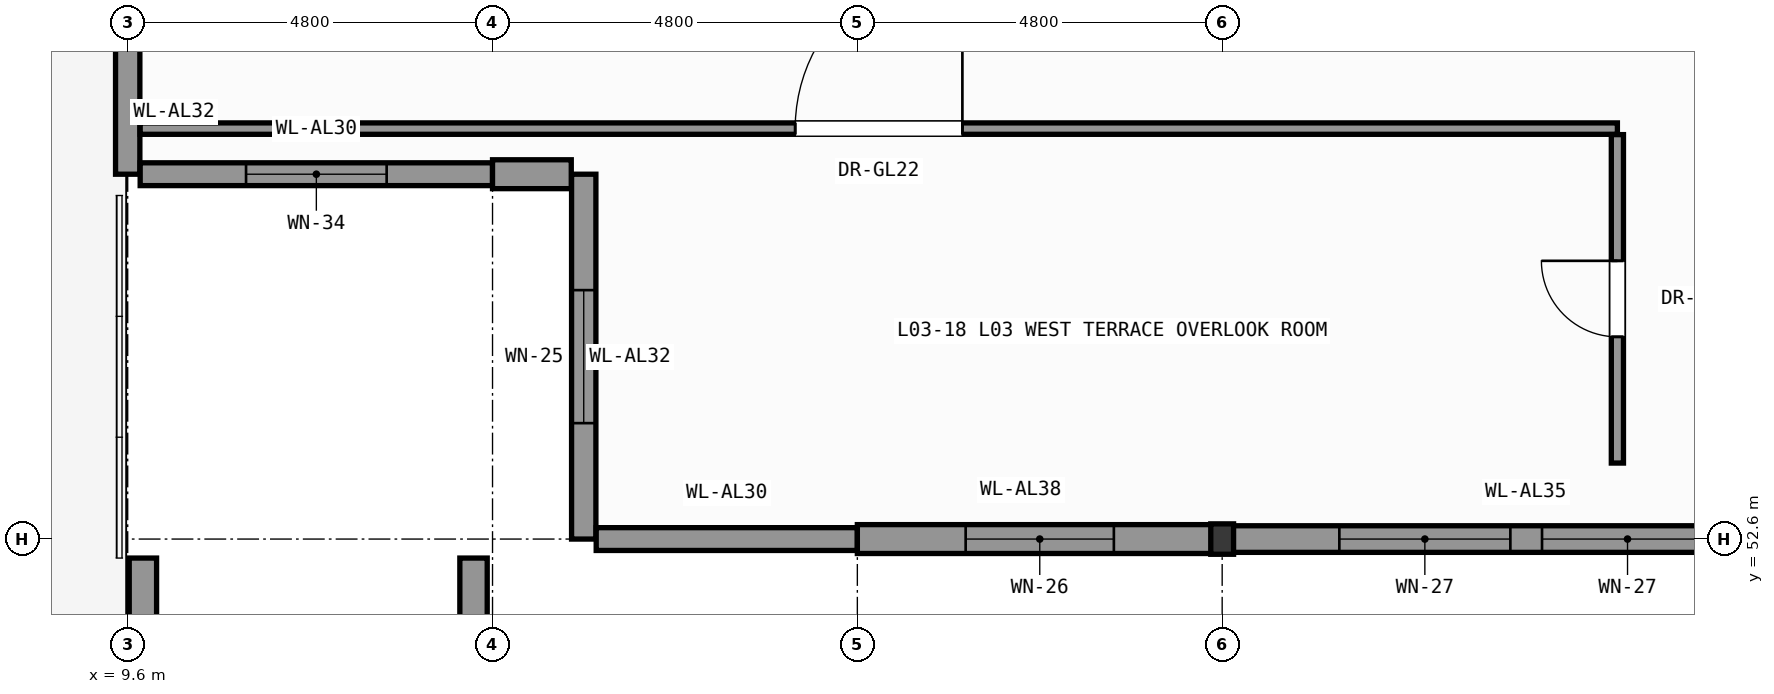
"""IFC4 building model, lengths in metres.
Left out: names, types, materials, properties, quantities, classifications, styles, units other than length and angle.
Written with IfcOpenShell. Run it as: python <this file> out.ifc"""

import sys

from ifc_helpers import new_model, si_unit, direction, frame, frame_2d, origin, origin_2d, place, context, subcontext, project, spatial, rectangle, i_section, extrude, element, fill, save


model = new_model("IFC4")
c1 = context("Model", 3, precision=1e-05, world=origin(), true_north=direction((0.0, 1.0)))
c2 = subcontext(c1, "Body", "Model", "MODEL_VIEW")
j1 = project(units=[si_unit("LENGTHUNIT", "METRE"), si_unit("PLANEANGLEUNIT", "RADIAN")], contexts=[c1])
p1 = place(None, origin())
s1 = spatial("IfcSite", under=j1, at=p1, CompositionType="ELEMENT")
p2 = place(p1, origin())
s2 = spatial("IfcBuilding", under=s1, at=p2, CompositionType="ELEMENT")
p3 = place(p2, frame((0.0, 0.0, 13.2)))
s3 = spatial("IfcBuildingStorey", under=s2, at=p3, CompositionType="ELEMENT", Elevation=13.2)
p4 = place(p3, frame((24.0, 52.6, 0.0), z_axis=(0.0, 0.0, 1.0), x_axis=(1.0, 0.0, 0.0)))
e1 = element("IfcColumn", 1, at=p4, inside=s3, PredefinedType="COLUMN", context=c2, shape_type="SweptSolid", body=[
    extrude(i_section(OverallWidth=0.3, OverallDepth=0.4, WebThickness=0.013, FlangeThickness=0.024, FilletRadius=0.027, at=origin_2d()), origin(), (0.0, 0.0, 1.0), 4.8),
])
p5 = place(p3, frame((15.6, 52.6, 0.0), z_axis=(0.0, 0.0, 1.0), x_axis=(0.0, 1.0, 0.0)))
e2 = element("IfcWall", 2, at=p5, inside=s3, PredefinedType="SOLIDWALL", context=c2, shape_type="SweptSolid", body=[
    extrude(rectangle(XDim=4.8, YDim=0.32, at=frame_2d((2.4, 0.0))), origin(), (0.0, 0.0, 1.0), 4.56),
])
p6 = place(p5, frame((1.525, 0.0, 0.95)))
e3 = element("IfcOpeningElement", 3, at=p6, cuts=e2, PredefinedType="OPENING", context=c2, shape_type="SweptSolid", body=[
    extrude(rectangle(XDim=1.75, YDim=2.35, at=frame_2d((0.875, 1.175))), frame((0.0, 0.17, 0.0), z_axis=(0.0, -1.0, 0.0), x_axis=(1.0, 0.0, 0.0)), (0.0, 0.0, 1.0), 0.34),
])
p7 = place(p3, frame((19.2, 52.6, 0.0), z_axis=(0.0, 0.0, 1.0), x_axis=(-1.0, 0.0, 0.0)))
e4 = element("IfcWall", 4, at=p7, inside=s3, PredefinedType="SOLIDWALL", context=c2, shape_type="SweptSolid", body=[
    extrude(rectangle(XDim=3.436, YDim=0.3, at=frame_2d((1.718, 0.0))), origin(), (0.0, 0.0, 1.0), 4.56),
])
p8 = place(p3, frame((24.0, 52.6, 0.0), z_axis=(0.0, 0.0, 1.0), x_axis=(-1.0, 0.0, 0.0)))
e5 = element("IfcWall", 5, at=p8, inside=s3, PredefinedType="SOLIDWALL", context=c2, shape_type="SweptSolid", body=[
    extrude(rectangle(XDim=4.8, YDim=0.38, at=frame_2d((2.4, 0.0))), origin(), (0.0, 0.0, 1.0), 4.56),
])
p9 = place(p8, frame((1.425, 0.0, 0.95)))
e6 = element("IfcOpeningElement", 6, at=p9, cuts=e5, PredefinedType="OPENING", context=c2, shape_type="SweptSolid", body=[
    extrude(rectangle(XDim=1.95, YDim=2.55, at=frame_2d((0.975, 1.275))), frame((0.0, 0.2, 0.0), z_axis=(0.0, -1.0, 0.0), x_axis=(1.0, 0.0, 0.0)), (0.0, 0.0, 1.0), 0.4),
])
p10 = place(p3, frame((32.0, 52.6, 0.0), z_axis=(0.0, 0.0, 1.0), x_axis=(-1.0, 0.0, 0.0)))
e7 = element("IfcWall", 7, at=p10, inside=s3, PredefinedType="SOLIDWALL", context=c2, shape_type="SweptSolid", body=[
    extrude(rectangle(XDim=8.0, YDim=0.35, at=frame_2d((4.0, 0.0))), origin(), (0.0, 0.0, 1.0), 4.315),
])
p11 = place(p10, frame((1.542, 0.0, 0.95)))
e8 = element("IfcOpeningElement", 8, at=p11, cuts=e7, PredefinedType="OPENING", context=c2, shape_type="SweptSolid", body=[
    extrude(rectangle(XDim=2.25, YDim=2.95, at=frame_2d((1.125, 1.475))), frame((0.0, 0.185, 0.0), z_axis=(0.0, -1.0, 0.0), x_axis=(1.0, 0.0, 0.0)), (0.0, 0.0, 1.0), 0.37),
])
p12 = place(p10, frame((4.208, 0.0, 0.95)))
e9 = element("IfcOpeningElement", 9, at=p12, cuts=e7, PredefinedType="OPENING", context=c2, shape_type="SweptSolid", body=[
    extrude(rectangle(XDim=2.25, YDim=2.95, at=frame_2d((1.125, 1.475))), frame((0.0, 0.185, 0.0), z_axis=(0.0, -1.0, 0.0), x_axis=(1.0, 0.0, 0.0)), (0.0, 0.0, 1.0), 0.37),
])
p13 = place(p3, frame((9.6, 57.4, 0.0), z_axis=(0.0, 0.0, 1.0), x_axis=(0.0, 1.0, 0.0)))
e10 = element("IfcWall", 10, at=p13, inside=s3, PredefinedType="SOLIDWALL", context=c2, shape_type="SweptSolid", body=[
    extrude(rectangle(XDim=2.2, YDim=0.32, at=frame_2d((1.1, 0.0))), origin(), (0.0, 0.0, 1.0), 4.56),
])
p14 = place(p3, frame((14.4, 57.4, 0.0), z_axis=(0.0, 0.0, 1.0), x_axis=(-1.0, 0.0, 0.0)))
e11 = element("IfcWall", 11, at=p14, inside=s3, PredefinedType="SOLIDWALL", context=c2, shape_type="SweptSolid", body=[
    extrude(rectangle(XDim=4.636, YDim=0.3, at=frame_2d((2.318, 0.0))), origin(), (0.0, 0.0, 1.0), 4.56),
])
p15 = place(p14, frame((1.393, 0.0, 0.95)))
e12 = element("IfcOpeningElement", 12, at=p15, cuts=e11, PredefinedType="OPENING", context=c2, shape_type="SweptSolid", body=[
    extrude(rectangle(XDim=1.85, YDim=3.15, at=frame_2d((0.925, 1.575))), frame((0.0, 0.16, 0.0), z_axis=(0.0, -1.0, 0.0), x_axis=(1.0, 0.0, 0.0)), (0.0, 0.0, 1.0), 0.32),
])
p16 = place(p3, frame((15.436, 57.4, 0.0), z_axis=(0.0, 0.0, 1.0), x_axis=(-1.0, 0.0, 0.0)))
e13 = element("IfcWall", 13, at=p16, inside=s3, PredefinedType="SOLIDWALL", context=c2, shape_type="SweptSolid", body=[
    extrude(rectangle(XDim=1.036, YDim=0.38, at=frame_2d((0.518, 0.0))), origin(), (0.0, 0.0, 1.0), 4.56),
])
for number, where, z_axis, x_axis in (
    (14, (9.8, 41.46, -13.2), (0.0, 0.0, 1.0), (0.0, 1.0, 0.0)),
    (15, (14.15, 41.46, -13.2), (0.0, 0.0, 1.0), (0.0, 1.0, 0.0)),
):
    element("IfcWall", number, at=place(p3, frame(where, z_axis=z_axis, x_axis=x_axis)), inside=s3, PredefinedType="SOLIDWALL", context=c2, shape_type="SweptSolid", body=[
        extrude(rectangle(XDim=10.89, YDim=0.36, at=frame_2d((5.445, 0.0))), origin(), (0.0, 0.0, 1.0), 17.78),
    ])
p17 = place(p3, frame((9.764, 58.0, 0.0), z_axis=(0.0, 0.0, 1.0), x_axis=(1.0, 0.0, 0.0)))
e16 = element("IfcWall", 16, at=p17, inside=s3, PredefinedType="PARTITIONING", context=c2, shape_type="SweptSolid", body=[
    extrude(rectangle(XDim=19.436, YDim=0.15, at=frame_2d((9.718, 0.0))), origin(), (0.0, 0.0, 1.0), 4.56),
])
p18 = place(p17, frame((8.618, 0.0, 0.0)))
e17 = element("IfcOpeningElement", 17, at=p18, cuts=e16, PredefinedType="OPENING", context=c2, shape_type="SweptSolid", body=[
    extrude(rectangle(XDim=2.2, YDim=2.6, at=frame_2d((1.1, 1.3))), frame((0.0, 0.085, 0.0), z_axis=(0.0, -1.0, 0.0), x_axis=(1.0, 0.0, 0.0)), (0.0, 0.0, 1.0), 0.17),
])
p19 = place(p3, frame((29.2, 53.6, 0.0), z_axis=(0.0, 0.0, 1.0), x_axis=(0.0, 1.0, 0.0)))
e18 = element("IfcWall", 18, at=p19, inside=s3, PredefinedType="PARTITIONING", context=c2, shape_type="SweptSolid", body=[
    extrude(rectangle(XDim=4.321, YDim=0.16, at=frame_2d((2.16, 0.0))), origin(), (0.0, 0.0, 1.0), 4.56),
])
p20 = place(p19, frame((1.66, 0.0, 0.0)))
e19 = element("IfcOpeningElement", 19, at=p20, cuts=e18, PredefinedType="OPENING", context=c2, shape_type="SweptSolid", body=[
    extrude(rectangle(XDim=1.0, YDim=2.15, at=frame_2d((0.5, 1.075))), frame((0.0, 0.09, 0.0), z_axis=(0.0, -1.0, 0.0), x_axis=(1.0, 0.0, 0.0)), (0.0, 0.0, 1.0), 0.18),
])
p21 = place(p6, origin())
e20 = element("IfcWindow", 20, at=p21, inside=s3, PartitioningType="SINGLE_PANEL", PredefinedType="WINDOW", context=c2, shape_type="SweptSolid", body=[
    extrude(rectangle(XDim=1.75, YDim=2.35, at=frame_2d((0.875, 1.175))), frame((0.0, 0.03, 0.0), z_axis=(0.0, -1.0, 0.0), x_axis=(1.0, 0.0, 0.0)), (0.0, 0.0, 1.0), 0.06),
])
fill(e3, e20)
p22 = place(p9, origin())
e21 = element("IfcWindow", 21, at=p22, inside=s3, PartitioningType="SINGLE_PANEL", PredefinedType="WINDOW", context=c2, shape_type="SweptSolid", body=[
    extrude(rectangle(XDim=1.95, YDim=2.55, at=frame_2d((0.975, 1.275))), frame((0.0, 0.03, 0.0), z_axis=(0.0, -1.0, 0.0), x_axis=(1.0, 0.0, 0.0)), (0.0, 0.0, 1.0), 0.06),
])
fill(e6, e21)
p23 = place(p11, origin())
e22 = element("IfcWindow", 22, at=p23, inside=s3, PartitioningType="SINGLE_PANEL", PredefinedType="WINDOW", context=c2, shape_type="SweptSolid", body=[
    extrude(rectangle(XDim=2.25, YDim=2.95, at=frame_2d((1.125, 1.475))), frame((0.0, 0.03, 0.0), z_axis=(0.0, -1.0, 0.0), x_axis=(1.0, 0.0, 0.0)), (0.0, 0.0, 1.0), 0.06),
])
fill(e8, e22)
p24 = place(p12, origin())
e23 = element("IfcWindow", 23, at=p24, inside=s3, PartitioningType="SINGLE_PANEL", PredefinedType="WINDOW", context=c2, shape_type="SweptSolid", body=[
    extrude(rectangle(XDim=2.25, YDim=2.95, at=frame_2d((1.125, 1.475))), frame((0.0, 0.03, 0.0), z_axis=(0.0, -1.0, 0.0), x_axis=(1.0, 0.0, 0.0)), (0.0, 0.0, 1.0), 0.06),
])
fill(e9, e23)
p25 = place(p15, origin())
e24 = element("IfcWindow", 24, at=p25, inside=s3, PartitioningType="SINGLE_PANEL", PredefinedType="WINDOW", context=c2, shape_type="SweptSolid", body=[
    extrude(rectangle(XDim=1.85, YDim=3.15, at=frame_2d((0.925, 1.575))), frame((0.0, 0.03, 0.0), z_axis=(0.0, -1.0, 0.0), x_axis=(1.0, 0.0, 0.0)), (0.0, 0.0, 1.0), 0.06),
])
fill(e12, e24)
p26 = place(p18, origin())
e25 = element("IfcDoor", 25, at=p26, inside=s3, OperationType="SINGLE_SWING_RIGHT", PredefinedType="DOOR", context=c2, shape_type="SweptSolid", body=[
    extrude(rectangle(XDim=2.2, YDim=2.6, at=frame_2d((1.1, 1.3))), frame((0.0, 0.025, 0.0), z_axis=(0.0, -1.0, 0.0), x_axis=(1.0, 0.0, 0.0)), (0.0, 0.0, 1.0), 0.05),
])
fill(e17, e25)
p27 = place(p20, origin())
e26 = element("IfcDoor", 26, at=p27, inside=s3, OperationType="SINGLE_SWING_RIGHT", PredefinedType="DOOR", context=c2, shape_type="SweptSolid", body=[
    extrude(rectangle(XDim=1.0, YDim=2.15, at=frame_2d((0.5, 1.075))), frame((0.0, 0.025, 0.0), z_axis=(0.0, -1.0, 0.0), x_axis=(1.0, 0.0, 0.0)), (0.0, 0.0, 1.0), 0.05),
])
fill(e19, e26)
save(model, sys.argv[1])
